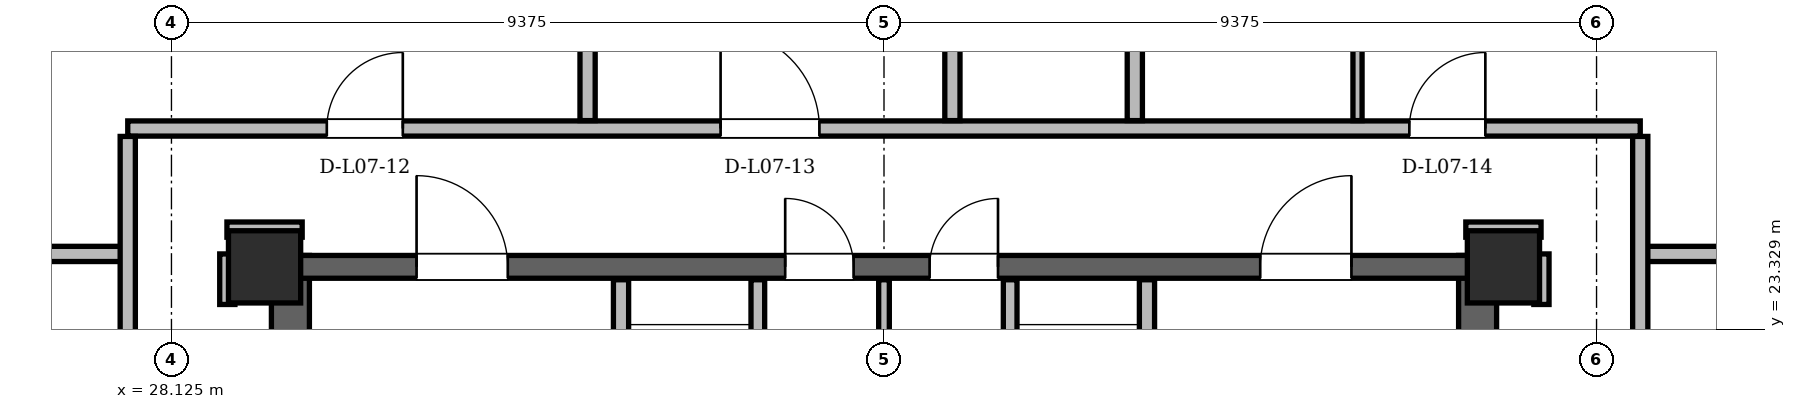
"""IFC4 building model, lengths in metres.
Left out: names, types, materials, properties, quantities, classifications, styles, units other than length and angle.
Written with IfcOpenShell. Run it as: python <this file> out.ifc"""

import sys

from ifc_helpers import new_model, si_unit, direction, frame, frame_2d, origin, origin_2d, place, context, subcontext, project, spatial, rectangle, hollow_rectangle, extrude, element, fill, save


model = new_model("IFC4")
c1 = context("Model", 3, precision=1e-05, world=origin(), true_north=direction((0.0, 1.0)))
c2 = subcontext(c1, "Body", "Model", "MODEL_VIEW")
j1 = project(units=[si_unit("LENGTHUNIT", "METRE"), si_unit("PLANEANGLEUNIT", "RADIAN")], contexts=[c1])
p1 = place(None, origin())
s1 = spatial("IfcSite", under=j1, at=p1, CompositionType="ELEMENT")
p2 = place(p1, origin())
s2 = spatial("IfcBuilding", under=s1, at=p2, CompositionType="ELEMENT")
p3 = place(p2, frame((0.0, 0.0, 30.9)))
s3 = spatial("IfcBuildingStorey", under=s2, at=p3, CompositionType="ELEMENT", Elevation=30.9)
for number, where, z_axis, x_axis in (
    (1, (45.65, 24.15, 0.0), (0.0, 0.0, 1.0), (1.0, 0.0, 0.0)),
    (2, (29.35, 24.15, 0.0), (0.0, 0.0, 1.0), (1.0, 0.0, 0.0)),
):
    element("IfcColumn", number, at=place(p3, frame(where, z_axis=z_axis, x_axis=x_axis)), inside=s3, PredefinedType="COLUMN", context=c2, shape_type="SweptSolid", body=[
        extrude(hollow_rectangle(XDim=0.95, YDim=0.95, WallThickness=0.08, at=origin_2d()), origin(), (0.0, 0.0, 1.0), 3.6),
    ])
for number, where, z_axis, x_axis in (
    (3, (29.69, 11.0, 0.0), (0.0, 0.0, 1.0), (0.0, 1.0, 0.0)),
    (4, (45.31, 11.0, 0.0), (0.0, 0.0, 1.0), (0.0, 1.0, 0.0)),
):
    element("IfcWall", number, at=place(p3, frame(where, z_axis=z_axis, x_axis=x_axis)), inside=s3, PredefinedType="SHEAR", context=c2, shape_type="SweptSolid", body=[
        extrude(rectangle(XDim=13.3, YDim=0.5, at=frame_2d((6.65, 0.0))), origin(), (0.0, 0.0, 1.0), 3.36),
    ])
p4 = place(p3, frame((29.65, 24.15, 0.0), z_axis=(0.0, 0.0, 1.0), x_axis=(1.0, 0.0, 0.0)))
e5 = element("IfcWall", 5, at=p4, inside=s3, PredefinedType="SHEAR", context=c2, shape_type="SweptSolid", body=[
    extrude(rectangle(XDim=15.7, YDim=0.3, at=frame_2d((7.85, 0.0))), origin(), (0.0, 0.0, 1.0), 3.36),
])
p5 = place(p4, frame((1.7, 0.0, 0.0)))
e6 = element("IfcOpeningElement", 6, at=p5, cuts=e5, PredefinedType="OPENING", context=c2, shape_type="SweptSolid", body=[
    extrude(rectangle(XDim=1.2, YDim=2.2, at=frame_2d((0.6, 1.1))), frame((0.0, 0.15, 0.0), z_axis=(0.0, -1.0, 0.0), x_axis=(1.0, 0.0, 0.0)), (0.0, 0.0, 1.0), 0.3),
])
p6 = place(p4, frame((12.8, 0.0, 0.0)))
e7 = element("IfcOpeningElement", 7, at=p6, cuts=e5, PredefinedType="OPENING", context=c2, shape_type="SweptSolid", body=[
    extrude(rectangle(XDim=1.2, YDim=2.2, at=frame_2d((0.6, 1.1))), frame((0.0, 0.15, 0.0), z_axis=(0.0, -1.0, 0.0), x_axis=(1.0, 0.0, 0.0)), (0.0, 0.0, 1.0), 0.3),
])
p7 = place(p4, frame((6.55, 0.0, 0.0)))
e8 = element("IfcOpeningElement", 8, at=p7, cuts=e5, PredefinedType="OPENING", context=c2, shape_type="SweptSolid", body=[
    extrude(rectangle(XDim=0.9, YDim=2.05, at=frame_2d((0.45, 1.025))), frame((0.0, 0.15, 0.0), z_axis=(0.0, -1.0, 0.0), x_axis=(1.0, 0.0, 0.0)), (0.0, 0.0, 1.0), 0.3),
])
p8 = place(p4, frame((8.45, 0.0, 0.0)))
e9 = element("IfcOpeningElement", 9, at=p8, cuts=e5, PredefinedType="OPENING", context=c2, shape_type="SweptSolid", body=[
    extrude(rectangle(XDim=0.9, YDim=2.05, at=frame_2d((0.45, 1.025))), frame((0.0, 0.15, 0.0), z_axis=(0.0, -1.0, 0.0), x_axis=(1.0, 0.0, 0.0)), (0.0, 0.0, 1.0), 0.3),
])
p9 = place(p3, frame((61.844, 15.204, 0.0), z_axis=(0.0, 0.0, 1.0), x_axis=(-0.500000372107, 0.866025188948, 0.0)))
e10 = element("IfcWall", 10, at=p9, inside=s3, PredefinedType="SOLIDWALL", context=c2, shape_type="SweptSolid", body=[
    extrude(rectangle(XDim=32.825, YDim=0.34, at=frame_2d((16.412, 0.0))), origin(), (0.0, 0.0, 1.0), 2.494),
])
p10 = place(p9, frame((6.159, 0.0, 0.0)))
e11 = element("IfcOpeningElement", 11, at=p10, cuts=e10, PredefinedType="OPENING", context=c2, shape_type="SweptSolid", body=[
    extrude(rectangle(XDim=1.5, YDim=2.2, at=frame_2d((0.75, 1.1))), frame((0.0, 0.17, 0.0), z_axis=(0.0, -1.0, 0.0), x_axis=(1.0, 0.0, 0.0)), (0.0, 0.0, 1.0), 0.34),
])
p11 = place(p9, frame((23.92, 0.0, 0.0)))
e12 = element("IfcOpeningElement", 12, at=p11, cuts=e10, PredefinedType="OPENING", context=c2, shape_type="SweptSolid", body=[
    extrude(rectangle(XDim=1.5, YDim=2.2, at=frame_2d((0.75, 1.1))), frame((0.0, 0.17, 0.0), z_axis=(0.0, -1.0, 0.0), x_axis=(1.0, 0.0, 0.0)), (0.0, 0.0, 1.0), 0.34),
])
p12 = place(p9, frame((2.18, 0.0, 0.85)))
e13 = element("IfcOpeningElement", 13, at=p12, cuts=e10, PredefinedType="OPENING", context=c2, shape_type="SweptSolid", body=[
    extrude(rectangle(XDim=2.2, YDim=1.534, at=frame_2d((1.1, 0.767))), frame((0.0, 0.17, 0.0), z_axis=(0.0, -1.0, 0.0), x_axis=(1.0, 0.0, 0.0)), (0.0, 0.0, 1.0), 0.34),
])
p13 = place(p9, frame((13.961, 0.0, 0.85)))
e14 = element("IfcOpeningElement", 14, at=p13, cuts=e10, PredefinedType="OPENING", context=c2, shape_type="SweptSolid", body=[
    extrude(rectangle(XDim=2.0, YDim=1.534, at=frame_2d((1.0, 0.767))), frame((0.0, 0.17, 0.0), z_axis=(0.0, -1.0, 0.0), x_axis=(1.0, 0.0, 0.0)), (0.0, 0.0, 1.0), 0.34),
])
p14 = place(p9, frame((28.489, 0.0, 0.85)))
e15 = element("IfcOpeningElement", 15, at=p14, cuts=e10, PredefinedType="OPENING", context=c2, shape_type="SweptSolid", body=[
    extrude(rectangle(XDim=1.4, YDim=1.534, at=frame_2d((0.7, 0.767))), frame((0.0, 0.17, 0.0), z_axis=(0.0, -1.0, 0.0), x_axis=(1.0, 0.0, 0.0)), (0.0, 0.0, 1.0), 0.34),
])
p15 = place(p3, frame((29.568, 43.631, 0.0), z_axis=(0.0, 0.0, 1.0), x_axis=(-0.500000372107, -0.866025188948, 0.0)))
e16 = element("IfcWall", 16, at=p15, inside=s3, PredefinedType="SOLIDWALL", context=c2, shape_type="SweptSolid", body=[
    extrude(rectangle(XDim=32.825, YDim=0.34, at=frame_2d((16.412, 0.0))), origin(), (0.0, 0.0, 1.0), 2.494),
])
p16 = place(p15, frame((6.159, 0.0, 0.0)))
e17 = element("IfcOpeningElement", 17, at=p16, cuts=e16, PredefinedType="OPENING", context=c2, shape_type="SweptSolid", body=[
    extrude(rectangle(XDim=1.5, YDim=2.2, at=frame_2d((0.75, 1.1))), frame((0.0, 0.17, 0.0), z_axis=(0.0, -1.0, 0.0), x_axis=(1.0, 0.0, 0.0)), (0.0, 0.0, 1.0), 0.34),
])
p17 = place(p15, frame((23.92, 0.0, 0.0)))
e18 = element("IfcOpeningElement", 18, at=p17, cuts=e16, PredefinedType="OPENING", context=c2, shape_type="SweptSolid", body=[
    extrude(rectangle(XDim=1.5, YDim=2.2, at=frame_2d((0.75, 1.1))), frame((0.0, 0.17, 0.0), z_axis=(0.0, -1.0, 0.0), x_axis=(1.0, 0.0, 0.0)), (0.0, 0.0, 1.0), 0.34),
])
p18 = place(p15, frame((29.16, 0.0, 0.85)))
e19 = element("IfcOpeningElement", 19, at=p18, cuts=e16, PredefinedType="OPENING", context=c2, shape_type="SweptSolid", body=[
    extrude(rectangle(XDim=2.4, YDim=1.534, at=frame_2d((1.2, 0.767))), frame((0.0, 0.17, 0.0), z_axis=(0.0, -1.0, 0.0), x_axis=(1.0, 0.0, 0.0)), (0.0, 0.0, 1.0), 0.34),
])
p19 = place(p15, frame((10.76, 0.0, 0.85)))
e20 = element("IfcOpeningElement", 20, at=p19, cuts=e16, PredefinedType="OPENING", context=c2, shape_type="SweptSolid", body=[
    extrude(rectangle(XDim=2.5, YDim=1.534, at=frame_2d((1.25, 0.767))), frame((0.0, 0.17, 0.0), z_axis=(0.0, -1.0, 0.0), x_axis=(1.0, 0.0, 0.0)), (0.0, 0.0, 1.0), 0.34),
])
p20 = place(p15, frame((17.732, 0.0, 0.85)))
e21 = element("IfcOpeningElement", 21, at=p20, cuts=e16, PredefinedType="OPENING", context=c2, shape_type="SweptSolid", body=[
    extrude(rectangle(XDim=2.4, YDim=1.534, at=frame_2d((1.2, 0.767))), frame((0.0, 0.17, 0.0), z_axis=(0.0, -1.0, 0.0), x_axis=(1.0, 0.0, 0.0)), (0.0, 0.0, 1.0), 0.34),
])
p21 = place(p15, frame((1.539, 0.0, 0.85)))
e22 = element("IfcOpeningElement", 22, at=p21, cuts=e16, PredefinedType="OPENING", context=c2, shape_type="SweptSolid", body=[
    extrude(rectangle(XDim=1.2, YDim=1.48, at=frame_2d((0.6, 0.74))), frame((0.0, 0.17, 0.0), z_axis=(0.0, -1.0, 0.0), x_axis=(1.0, 0.0, 0.0)), (0.0, 0.0, 1.0), 0.34),
])
p22 = place(p15, frame((0.69, 0.0, 0.85)))
e23 = element("IfcOpeningElement", 23, at=p22, cuts=e16, PredefinedType="OPENING", context=c2, shape_type="SweptSolid", body=[
    extrude(rectangle(XDim=0.7, YDim=1.2, at=frame_2d((0.35, 0.6))), frame((0.0, 0.17, 0.0), z_axis=(0.0, -1.0, 0.0), x_axis=(1.0, 0.0, 0.0)), (0.0, 0.0, 1.0), 0.34),
])
p23 = place(p3, frame((34.04, 19.48, 0.0), z_axis=(0.0, 0.0, 1.0), x_axis=(0.0, 1.0, 0.0)))
e24 = element("IfcWall", 24, at=p23, inside=s3, PredefinedType="PARTITIONING", context=c2, shape_type="SweptSolid", body=[
    extrude(rectangle(XDim=4.5, YDim=0.2, at=frame_2d((2.25, 0.0))), origin(), (0.0, 0.0, 1.0), 2.4),
])
p24 = place(p23, frame((2.12, 0.0, 0.0)))
e25 = element("IfcOpeningElement", 25, at=p24, cuts=e24, PredefinedType="OPENING", context=c2, shape_type="SweptSolid", body=[
    extrude(rectangle(XDim=1.1, YDim=2.2, at=frame_2d((0.55, 1.1))), frame((0.0, 0.1, 0.0), z_axis=(0.0, -1.0, 0.0), x_axis=(1.0, 0.0, 0.0)), (0.0, 0.0, 1.0), 0.2),
])
p25 = place(p3, frame((35.84, 20.96, 0.0), z_axis=(0.0, 0.0, 1.0), x_axis=(0.0, 1.0, 0.0)))
e26 = element("IfcWall", 26, at=p25, inside=s3, PredefinedType="PARTITIONING", context=c2, shape_type="SweptSolid", body=[
    extrude(rectangle(XDim=3.02, YDim=0.18, at=frame_2d((1.51, 0.0))), origin(), (0.0, 0.0, 1.0), 2.4),
])
p26 = place(p3, frame((40.96, 19.48, 0.0), z_axis=(0.0, 0.0, 1.0), x_axis=(0.0, 1.0, 0.0)))
e27 = element("IfcWall", 27, at=p26, inside=s3, PredefinedType="PARTITIONING", context=c2, shape_type="SweptSolid", body=[
    extrude(rectangle(XDim=4.5, YDim=0.2, at=frame_2d((2.25, 0.0))), origin(), (0.0, 0.0, 1.0), 2.4),
])
p27 = place(p26, frame((2.12, 0.0, 0.0)))
e28 = element("IfcOpeningElement", 28, at=p27, cuts=e27, PredefinedType="OPENING", context=c2, shape_type="SweptSolid", body=[
    extrude(rectangle(XDim=1.1, YDim=2.2, at=frame_2d((0.55, 1.1))), frame((0.0, 0.1, 0.0), z_axis=(0.0, -1.0, 0.0), x_axis=(1.0, 0.0, 0.0)), (0.0, 0.0, 1.0), 0.2),
])
p28 = place(p3, frame((39.16, 20.96, 0.0), z_axis=(0.0, 0.0, 1.0), x_axis=(0.0, 1.0, 0.0)))
e29 = element("IfcWall", 29, at=p28, inside=s3, PredefinedType="PARTITIONING", context=c2, shape_type="SweptSolid", body=[
    extrude(rectangle(XDim=3.02, YDim=0.18, at=frame_2d((1.51, 0.0))), origin(), (0.0, 0.0, 1.0), 2.4),
])
p29 = place(p3, frame((37.5, 21.06, 0.0), z_axis=(0.0, 0.0, 1.0), x_axis=(0.0, 1.0, 0.0)))
e30 = element("IfcWall", 30, at=p29, inside=s3, PredefinedType="PARTITIONING", context=c2, shape_type="SweptSolid", body=[
    extrude(rectangle(XDim=2.92, YDim=0.14, at=frame_2d((1.46, 0.0))), origin(), (0.0, 0.0, 1.0), 2.4),
])
for number, where, z_axis, x_axis in (
    (31, (18.62, 24.32, 0.0), (0.0, 0.0, 1.0), (1.0, 0.0, 0.0)),
    (32, (47.45, 24.32, 0.0), (0.0, 0.0, 1.0), (1.0, 0.0, 0.0)),
):
    element("IfcWall", number, at=place(p3, frame(where, z_axis=z_axis, x_axis=x_axis)), inside=s3, PredefinedType="PARTITIONING", context=c2, shape_type="SweptSolid", body=[
        extrude(rectangle(XDim=8.93, YDim=0.2, at=frame_2d((4.465, 0.0))), origin(), (0.0, 0.0, 1.0), 2.494),
    ])
for number, where, z_axis, x_axis in (
    (33, (28.855, 24.64, 0.0), (0.0, 0.0, 1.0), (1.0, 0.0, 0.0)),
    (34, (45.155, 24.64, 0.0), (0.0, 0.0, 1.0), (1.0, 0.0, 0.0)),
):
    element("IfcWall", number, at=place(p3, frame(where, z_axis=z_axis, x_axis=x_axis)), inside=s3, PredefinedType="PARTITIONING", context=c2, shape_type="SweptSolid", body=[
        extrude(rectangle(XDim=0.99, YDim=0.2, at=frame_2d((0.495, 0.0))), origin(), (0.0, 0.0, 1.0), 2.738),
    ])
p30 = place(p3, frame((27.55, 25.97, 0.0), z_axis=(0.0, 0.0, 1.0), x_axis=(1.0, 0.0, 0.0)))
e35 = element("IfcWall", 35, at=p30, inside=s3, PredefinedType="PARTITIONING", context=c2, shape_type="SweptSolid", body=[
    extrude(rectangle(XDim=19.9, YDim=0.2, at=frame_2d((9.95, 0.0))), origin(), (0.0, 0.0, 1.0), 2.738),
])
p31 = place(p30, frame((2.619, 0.0, 0.0)))
e36 = element("IfcOpeningElement", 36, at=p31, cuts=e35, PredefinedType="OPENING", context=c2, shape_type="SweptSolid", body=[
    extrude(rectangle(XDim=1.0, YDim=2.18, at=frame_2d((0.5, 1.09))), frame((0.0, 0.1, 0.0), z_axis=(0.0, -1.0, 0.0), x_axis=(1.0, 0.0, 0.0)), (0.0, 0.0, 1.0), 0.2),
])
p32 = place(p30, frame((7.8, 0.0, 0.0)))
e37 = element("IfcOpeningElement", 37, at=p32, cuts=e35, PredefinedType="OPENING", context=c2, shape_type="SweptSolid", body=[
    extrude(rectangle(XDim=1.3, YDim=2.2, at=frame_2d((0.65, 1.1))), frame((0.0, 0.1, 0.0), z_axis=(0.0, -1.0, 0.0), x_axis=(1.0, 0.0, 0.0)), (0.0, 0.0, 1.0), 0.2),
])
p33 = place(p30, frame((16.862, 0.0, 0.0)))
e38 = element("IfcOpeningElement", 38, at=p33, cuts=e35, PredefinedType="OPENING", context=c2, shape_type="SweptSolid", body=[
    extrude(rectangle(XDim=1.0, YDim=2.18, at=frame_2d((0.5, 1.09))), frame((0.0, 0.1, 0.0), z_axis=(0.0, -1.0, 0.0), x_axis=(1.0, 0.0, 0.0)), (0.0, 0.0, 1.0), 0.2),
])
p34 = place(p3, frame((27.55, 11.054, 0.0), z_axis=(0.0, 0.0, 1.0), x_axis=(0.0, 1.0, 0.0)))
e39 = element("IfcWall", 39, at=p34, inside=s3, PredefinedType="PARTITIONING", context=c2, shape_type="SweptSolid", body=[
    extrude(rectangle(XDim=14.812, YDim=0.2, at=frame_2d((7.406, 0.0))), origin(), (0.0, 0.0, 1.0), 2.738),
])
p35 = place(p34, frame((7.932, 0.0, 0.0)))
e40 = element("IfcOpeningElement", 40, at=p35, cuts=e39, PredefinedType="OPENING", context=c2, shape_type="SweptSolid", body=[
    extrude(rectangle(XDim=1.0, YDim=2.18, at=frame_2d((0.5, 1.09))), frame((0.0, 0.1, 0.0), z_axis=(0.0, -1.0, 0.0), x_axis=(1.0, 0.0, 0.0)), (0.0, 0.0, 1.0), 0.2),
])
p36 = place(p3, frame((28.86, 23.655, 0.0), z_axis=(0.0, 0.0, 1.0), x_axis=(0.0, 1.0, 0.0)))
e41 = element("IfcWall", 41, at=p36, inside=s3, PredefinedType="PARTITIONING", context=c2, shape_type="SweptSolid", body=[
    extrude(rectangle(XDim=0.665, YDim=0.2, at=frame_2d((0.333, 0.0))), origin(), (0.0, 0.0, 1.0), 3.36),
])
for number, where, z_axis, x_axis in (
    (42, (33.6, 26.074, 0.0), (0.0, 0.0, 1.0), (0.0, 1.0, 0.0)),
    (43, (38.4, 26.074, 0.0), (0.0, 0.0, 1.0), (0.0, 1.0, 0.0)),
):
    element("IfcWall", number, at=place(p3, frame(where, z_axis=z_axis, x_axis=x_axis)), inside=s3, PredefinedType="PARTITIONING", context=c2, shape_type="SweptSolid", body=[
        extrude(rectangle(XDim=4.292, YDim=0.2, at=frame_2d((2.146, 0.0))), origin(), (0.0, 0.0, 1.0), 3.36),
    ])
p37 = place(p3, frame((40.8, 26.074, 0.0), z_axis=(0.0, 0.0, 1.0), x_axis=(0.0, 1.0, 0.0)))
e44 = element("IfcWall", 44, at=p37, inside=s3, PredefinedType="PARTITIONING", context=c2, shape_type="SweptSolid", body=[
    extrude(rectangle(XDim=17.383, YDim=0.2, at=frame_2d((8.691, 0.0))), origin(), (0.0, 0.0, 1.0), 3.36),
])
p38 = place(p3, frame((43.73, 26.074, 0.0), z_axis=(0.0, 0.0, 1.0), x_axis=(0.0, 1.0, 0.0)))
e45 = element("IfcWall", 45, at=p38, inside=s3, PredefinedType="PARTITIONING", context=c2, shape_type="SweptSolid", body=[
    extrude(rectangle(XDim=17.383, YDim=0.12, at=frame_2d((8.691, 0.0))), origin(), (0.0, 0.0, 1.0), 3.36),
])
p39 = place(p38, frame((1.292, 0.0, 0.0)))
e46 = element("IfcOpeningElement", 46, at=p39, cuts=e45, PredefinedType="OPENING", context=c2, shape_type="SweptSolid", body=[
    extrude(rectangle(XDim=0.92, YDim=2.12, at=frame_2d((0.46, 1.06))), frame((0.0, 0.06, 0.0), z_axis=(0.0, -1.0, 0.0), x_axis=(1.0, 0.0, 0.0)), (0.0, 0.0, 1.0), 0.12),
])
p40 = place(p38, frame((4.939, 0.0, 0.0)))
e47 = element("IfcOpeningElement", 47, at=p40, cuts=e45, PredefinedType="OPENING", context=c2, shape_type="SweptSolid", body=[
    extrude(rectangle(XDim=0.92, YDim=2.12, at=frame_2d((0.46, 1.06))), frame((0.0, 0.06, 0.0), z_axis=(0.0, -1.0, 0.0), x_axis=(1.0, 0.0, 0.0)), (0.0, 0.0, 1.0), 0.12),
])
p41 = place(p38, frame((8.068, 0.0, 0.0)))
e48 = element("IfcOpeningElement", 48, at=p41, cuts=e45, PredefinedType="OPENING", context=c2, shape_type="SweptSolid", body=[
    extrude(rectangle(XDim=0.95, YDim=2.1, at=frame_2d((0.475, 1.05))), frame((0.0, 0.06, 0.0), z_axis=(0.0, -1.0, 0.0), x_axis=(1.0, 0.0, 0.0)), (0.0, 0.0, 1.0), 0.12),
])
p42 = place(p38, frame((10.709, 0.0, 0.0)))
e49 = element("IfcOpeningElement", 49, at=p42, cuts=e45, PredefinedType="OPENING", context=c2, shape_type="SweptSolid", body=[
    extrude(rectangle(XDim=0.95, YDim=2.1, at=frame_2d((0.475, 1.05))), frame((0.0, 0.06, 0.0), z_axis=(0.0, -1.0, 0.0), x_axis=(1.0, 0.0, 0.0)), (0.0, 0.0, 1.0), 0.12),
])
p43 = place(p38, frame((13.491, 0.0, 0.0)))
e50 = element("IfcOpeningElement", 50, at=p43, cuts=e45, PredefinedType="OPENING", context=c2, shape_type="SweptSolid", body=[
    extrude(rectangle(XDim=0.95, YDim=2.1, at=frame_2d((0.475, 1.05))), frame((0.0, 0.06, 0.0), z_axis=(0.0, -1.0, 0.0), x_axis=(1.0, 0.0, 0.0)), (0.0, 0.0, 1.0), 0.12),
])
p44 = place(p38, frame((15.848, 0.0, 0.0)))
e51 = element("IfcOpeningElement", 51, at=p44, cuts=e45, PredefinedType="OPENING", context=c2, shape_type="SweptSolid", body=[
    extrude(rectangle(XDim=0.88, YDim=2.08, at=frame_2d((0.44, 1.04))), frame((0.0, 0.06, 0.0), z_axis=(0.0, -1.0, 0.0), x_axis=(1.0, 0.0, 0.0)), (0.0, 0.0, 1.0), 0.12),
])
p45 = place(p3, frame((46.15, 23.655, 0.0), z_axis=(0.0, 0.0, 1.0), x_axis=(0.0, 1.0, 0.0)))
e52 = element("IfcWall", 52, at=p45, inside=s3, PredefinedType="PARTITIONING", context=c2, shape_type="SweptSolid", body=[
    extrude(rectangle(XDim=0.665, YDim=0.2, at=frame_2d((0.333, 0.0))), origin(), (0.0, 0.0, 1.0), 3.36),
])
p46 = place(p3, frame((47.45, 11.054, 0.0), z_axis=(0.0, 0.0, 1.0), x_axis=(0.0, 1.0, 0.0)))
e53 = element("IfcWall", 53, at=p46, inside=s3, PredefinedType="PARTITIONING", context=c2, shape_type="SweptSolid", body=[
    extrude(rectangle(XDim=14.812, YDim=0.2, at=frame_2d((7.406, 0.0))), origin(), (0.0, 0.0, 1.0), 2.738),
])
p47 = place(p46, frame((7.932, 0.0, 0.0)))
e54 = element("IfcOpeningElement", 54, at=p47, cuts=e53, PredefinedType="OPENING", context=c2, shape_type="SweptSolid", body=[
    extrude(rectangle(XDim=1.0, YDim=2.18, at=frame_2d((0.5, 1.09))), frame((0.0, 0.1, 0.0), z_axis=(0.0, -1.0, 0.0), x_axis=(1.0, 0.0, 0.0)), (0.0, 0.0, 1.0), 0.2),
])
p48 = place(p5, origin())
e55 = element("IfcDoor", 55, at=p48, inside=s3, OperationType="SINGLE_SWING_LEFT", PredefinedType="DOOR", context=c2, shape_type="SweptSolid", body=[
    extrude(rectangle(XDim=1.2, YDim=2.2, at=frame_2d((0.6, 1.1))), frame((0.0, 0.025, 0.0), z_axis=(0.0, -1.0, 0.0), x_axis=(1.0, 0.0, 0.0)), (0.0, 0.0, 1.0), 0.05),
])
fill(e6, e55)
p49 = place(p6, origin())
e56 = element("IfcDoor", 56, at=p49, inside=s3, OperationType="SINGLE_SWING_RIGHT", PredefinedType="DOOR", context=c2, shape_type="SweptSolid", body=[
    extrude(rectangle(XDim=1.2, YDim=2.2, at=frame_2d((0.6, 1.1))), frame((0.0, 0.025, 0.0), z_axis=(0.0, -1.0, 0.0), x_axis=(1.0, 0.0, 0.0)), (0.0, 0.0, 1.0), 0.05),
])
fill(e7, e56)
p50 = place(p7, origin())
e57 = element("IfcDoor", 57, at=p50, inside=s3, OperationType="SINGLE_SWING_LEFT", PredefinedType="DOOR", context=c2, shape_type="SweptSolid", body=[
    extrude(rectangle(XDim=0.9, YDim=2.05, at=frame_2d((0.45, 1.025))), frame((0.0, 0.025, 0.0), z_axis=(0.0, -1.0, 0.0), x_axis=(1.0, 0.0, 0.0)), (0.0, 0.0, 1.0), 0.05),
])
fill(e8, e57)
p51 = place(p8, origin())
e58 = element("IfcDoor", 58, at=p51, inside=s3, OperationType="SINGLE_SWING_RIGHT", PredefinedType="DOOR", context=c2, shape_type="SweptSolid", body=[
    extrude(rectangle(XDim=0.9, YDim=2.05, at=frame_2d((0.45, 1.025))), frame((0.0, 0.025, 0.0), z_axis=(0.0, -1.0, 0.0), x_axis=(1.0, 0.0, 0.0)), (0.0, 0.0, 1.0), 0.05),
])
fill(e9, e58)
p52 = place(p31, origin())
e59 = element("IfcDoor", 59, at=p52, inside=s3, OperationType="SINGLE_SWING_RIGHT", PredefinedType="DOOR", context=c2, shape_type="SweptSolid", body=[
    extrude(rectangle(XDim=1.0, YDim=2.18, at=frame_2d((0.5, 1.09))), frame((0.0, 0.025, 0.0), z_axis=(0.0, -1.0, 0.0), x_axis=(1.0, 0.0, 0.0)), (0.0, 0.0, 1.0), 0.05),
])
fill(e36, e59)
p53 = place(p32, origin())
e60 = element("IfcDoor", 60, at=p53, inside=s3, OperationType="SINGLE_SWING_LEFT", PredefinedType="DOOR", context=c2, shape_type="SweptSolid", body=[
    extrude(rectangle(XDim=1.3, YDim=2.2, at=frame_2d((0.65, 1.1))), frame((0.0, 0.025, 0.0), z_axis=(0.0, -1.0, 0.0), x_axis=(1.0, 0.0, 0.0)), (0.0, 0.0, 1.0), 0.05),
])
fill(e37, e60)
p54 = place(p33, origin())
e61 = element("IfcDoor", 61, at=p54, inside=s3, OperationType="SINGLE_SWING_RIGHT", PredefinedType="DOOR", context=c2, shape_type="SweptSolid", body=[
    extrude(rectangle(XDim=1.0, YDim=2.18, at=frame_2d((0.5, 1.09))), frame((0.0, 0.025, 0.0), z_axis=(0.0, -1.0, 0.0), x_axis=(1.0, 0.0, 0.0)), (0.0, 0.0, 1.0), 0.05),
])
fill(e38, e61)
save(model, sys.argv[1])
